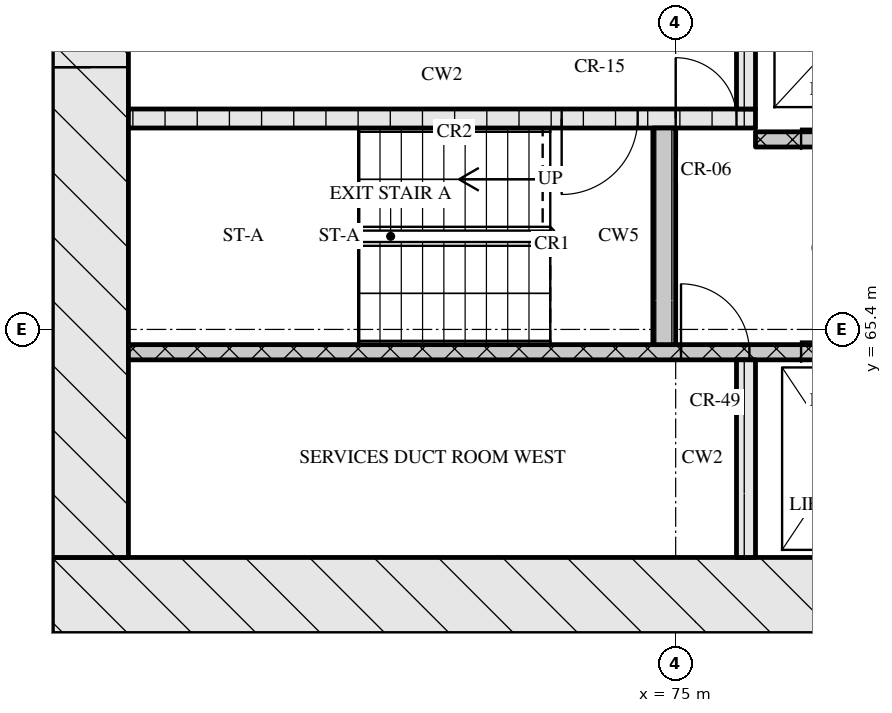
"""IFC4 building model, lengths in metres.
Left out: names, types, materials, properties, quantities, classifications, styles, units other than length and angle.
Written with IfcOpenShell. Run it as: python <this file> out.ifc"""

import sys

from ifc_helpers import new_model, si_unit, direction, frame, frame_2d, origin, place, context, subcontext, project, spatial, rectangle, extrude, element, fill, save


model = new_model("IFC4")
c1 = context("Model", 3, precision=1e-05, world=origin(), true_north=direction((0.0, 1.0)))
c2 = subcontext(c1, "Body", "Model", "MODEL_VIEW")
j1 = project(units=[si_unit("LENGTHUNIT", "METRE"), si_unit("PLANEANGLEUNIT", "RADIAN")], contexts=[c1])
p1 = place(None, origin())
s1 = spatial("IfcSite", under=j1, at=p1, CompositionType="ELEMENT")
p2 = place(p1, origin())
s2 = spatial("IfcBuilding", under=s1, at=p2, CompositionType="ELEMENT")
p3 = place(p2, frame((0.0, 0.0, 116.85)))
s3 = spatial("IfcBuildingStorey", under=s2, at=p3, CompositionType="ELEMENT", Elevation=116.85)
p4 = place(p3, frame((66.8, 61.9, 0.0), z_axis=(0.0, 0.0, 1.0), x_axis=(1.0, 0.0, 0.0)))
e1 = element("IfcWall", 1, at=p4, inside=s3, PredefinedType="SOLIDWALL", context=c2, shape_type="SweptSolid", body=[
    extrude(rectangle(XDim=41.6, YDim=1.0, at=frame_2d((20.8, 0.0))), origin(), (0.0, 0.0, 1.0), 3.32),
])
p5 = place(p4, frame((21.15, 0.0, 0.0)))
e2 = element("IfcOpeningElement", 2, at=p5, cuts=e1, PredefinedType="OPENING", context=c2, shape_type="SweptSolid", body=[
    extrude(rectangle(XDim=1.8, YDim=2.1, at=frame_2d((0.9, 1.05))), frame((0.0, 0.51, 0.0), z_axis=(0.0, -1.0, 0.0), x_axis=(1.0, 0.0, 0.0)), (0.0, 0.0, 1.0), 1.02),
])
p6 = place(p3, frame((67.3, 62.4, 0.0), z_axis=(0.0, 0.0, 1.0), x_axis=(0.0, 1.0, 0.0)))
e3 = element("IfcWall", 3, at=p6, inside=s3, PredefinedType="SOLIDWALL", context=c2, shape_type="SweptSolid", body=[
    extrude(rectangle(XDim=12.0, YDim=1.0, at=frame_2d((6.0, 0.0))), origin(), (0.0, 0.0, 1.0), 3.32),
])
p7 = place(p6, frame((6.45, 0.0, 0.0)))
e4 = element("IfcOpeningElement", 4, at=p7, cuts=e3, PredefinedType="OPENING", context=c2, shape_type="SweptSolid", body=[
    extrude(rectangle(XDim=1.2, YDim=2.1, at=frame_2d((0.6, 1.05))), frame((0.0, 0.51, 0.0), z_axis=(0.0, -1.0, 0.0), x_axis=(1.0, 0.0, 0.0)), (0.0, 0.0, 1.0), 1.02),
])
p8 = place(p3, frame((75.925, 62.4, 0.0), z_axis=(0.0, 0.0, 1.0), x_axis=(0.0, 1.0, 0.0)))
e5 = element("IfcWall", 5, at=p8, inside=s3, PredefinedType="SOLIDWALL", context=c2, shape_type="SweptSolid", body=[
    extrude(rectangle(XDim=2.6, YDim=0.25, at=frame_2d((1.3, 0.0))), origin(), (0.0, 0.0, 1.0), 3.32),
])
p9 = place(p3, frame((67.8, 65.1, 0.0), z_axis=(0.0, 0.0, 1.0), x_axis=(1.0, 0.0, 0.0)))
e6 = element("IfcWall", 6, at=p9, inside=s3, PredefinedType="SOLIDWALL", context=c2, shape_type="SweptSolid", body=[
    extrude(rectangle(XDim=18.5, YDim=0.2, at=frame_2d((9.25, 0.0))), origin(), (0.0, 0.0, 1.0), 3.32),
])
p10 = place(p9, frame((7.27, 0.0, 0.0)))
e7 = element("IfcOpeningElement", 7, at=p10, cuts=e6, PredefinedType="OPENING", context=c2, shape_type="SweptSolid", body=[
    extrude(rectangle(XDim=0.9, YDim=2.1, at=frame_2d((0.45, 1.05))), frame((0.0, 0.11, 0.0), z_axis=(0.0, -1.0, 0.0), x_axis=(1.0, 0.0, 0.0)), (0.0, 0.0, 1.0), 0.22),
])
p11 = place(p9, frame((8.85, 0.0, 0.0)))
e8 = element("IfcOpeningElement", 8, at=p11, cuts=e6, PredefinedType="OPENING", context=c2, shape_type="SweptSolid", body=[
    extrude(rectangle(XDim=1.1, YDim=2.1, at=frame_2d((0.55, 1.05))), frame((0.0, 0.11, 0.0), z_axis=(0.0, -1.0, 0.0), x_axis=(1.0, 0.0, 0.0)), (0.0, 0.0, 1.0), 0.22),
])
p12 = place(p9, frame((11.35, 0.0, 0.0)))
e9 = element("IfcOpeningElement", 9, at=p12, cuts=e6, PredefinedType="OPENING", context=c2, shape_type="SweptSolid", body=[
    extrude(rectangle(XDim=1.1, YDim=2.1, at=frame_2d((0.55, 1.05))), frame((0.0, 0.11, 0.0), z_axis=(0.0, -1.0, 0.0), x_axis=(1.0, 0.0, 0.0)), (0.0, 0.0, 1.0), 0.22),
])
p13 = place(p9, frame((13.85, 0.0, 0.0)))
e10 = element("IfcOpeningElement", 10, at=p13, cuts=e6, PredefinedType="OPENING", context=c2, shape_type="SweptSolid", body=[
    extrude(rectangle(XDim=1.1, YDim=2.1, at=frame_2d((0.55, 1.05))), frame((0.0, 0.11, 0.0), z_axis=(0.0, -1.0, 0.0), x_axis=(1.0, 0.0, 0.0)), (0.0, 0.0, 1.0), 0.22),
])
p14 = place(p9, frame((16.7, 0.0, 0.0)))
e11 = element("IfcOpeningElement", 11, at=p14, cuts=e6, PredefinedType="OPENING", context=c2, shape_type="SweptSolid", body=[
    extrude(rectangle(XDim=0.9, YDim=2.1, at=frame_2d((0.45, 1.05))), frame((0.0, 0.11, 0.0), z_axis=(0.0, -1.0, 0.0), x_axis=(1.0, 0.0, 0.0)), (0.0, 0.0, 1.0), 0.22),
])
p15 = place(p3, frame((74.85, 65.2, 0.0), z_axis=(0.0, 0.0, 1.0), x_axis=(0.0, 1.0, 0.0)))
e12 = element("IfcWall", 12, at=p15, inside=s3, PredefinedType="SOLIDWALL", context=c2, shape_type="SweptSolid", body=[
    extrude(rectangle(XDim=2.85, YDim=0.3, at=frame_2d((1.425, 0.0))), origin(), (0.0, 0.0, 1.0), 3.32),
])
p16 = place(p3, frame((76.05, 67.9, 0.0), z_axis=(0.0, 0.0, 1.0), x_axis=(1.0, 0.0, 0.0)))
e13 = element("IfcWall", 13, at=p16, inside=s3, PredefinedType="SOLIDWALL", context=c2, shape_type="SweptSolid", body=[
    extrude(rectangle(XDim=23.1, YDim=0.2, at=frame_2d((11.55, 0.0))), origin(), (0.0, 0.0, 1.0), 3.32),
])
p17 = place(p16, frame((0.6, 0.0, 0.0)))
e14 = element("IfcOpeningElement", 14, at=p17, cuts=e13, PredefinedType="OPENING", context=c2, shape_type="SweptSolid", body=[
    extrude(rectangle(XDim=1.1, YDim=2.1, at=frame_2d((0.55, 1.05))), frame((0.0, 0.11, 0.0), z_axis=(0.0, -1.0, 0.0), x_axis=(1.0, 0.0, 0.0)), (0.0, 0.0, 1.0), 0.22),
])
p18 = place(p16, frame((3.1, 0.0, 0.0)))
e15 = element("IfcOpeningElement", 15, at=p18, cuts=e13, PredefinedType="OPENING", context=c2, shape_type="SweptSolid", body=[
    extrude(rectangle(XDim=1.1, YDim=2.1, at=frame_2d((0.55, 1.05))), frame((0.0, 0.11, 0.0), z_axis=(0.0, -1.0, 0.0), x_axis=(1.0, 0.0, 0.0)), (0.0, 0.0, 1.0), 0.22),
])
p19 = place(p16, frame((5.6, 0.0, 0.0)))
e16 = element("IfcOpeningElement", 16, at=p19, cuts=e13, PredefinedType="OPENING", context=c2, shape_type="SweptSolid", body=[
    extrude(rectangle(XDim=1.1, YDim=2.1, at=frame_2d((0.55, 1.05))), frame((0.0, 0.11, 0.0), z_axis=(0.0, -1.0, 0.0), x_axis=(1.0, 0.0, 0.0)), (0.0, 0.0, 1.0), 0.22),
])
p20 = place(p16, frame((8.45, 0.0, 0.0)))
e17 = element("IfcOpeningElement", 17, at=p20, cuts=e13, PredefinedType="OPENING", context=c2, shape_type="SweptSolid", body=[
    extrude(rectangle(XDim=0.9, YDim=2.1, at=frame_2d((0.45, 1.05))), frame((0.0, 0.11, 0.0), z_axis=(0.0, -1.0, 0.0), x_axis=(1.0, 0.0, 0.0)), (0.0, 0.0, 1.0), 0.22),
])
p21 = place(p16, frame((10.91, 0.0, 0.0)))
e18 = element("IfcOpeningElement", 18, at=p21, cuts=e13, PredefinedType="OPENING", context=c2, shape_type="SweptSolid", body=[
    extrude(rectangle(XDim=0.9, YDim=2.1, at=frame_2d((0.45, 1.05))), frame((0.0, 0.11, 0.0), z_axis=(0.0, -1.0, 0.0), x_axis=(1.0, 0.0, 0.0)), (0.0, 0.0, 1.0), 0.22),
])
p22 = place(p16, frame((13.55, 0.0, 0.0)))
e19 = element("IfcOpeningElement", 19, at=p22, cuts=e13, PredefinedType="OPENING", context=c2, shape_type="SweptSolid", body=[
    extrude(rectangle(XDim=1.0, YDim=2.1, at=frame_2d((0.5, 1.05))), frame((0.0, 0.11, 0.0), z_axis=(0.0, -1.0, 0.0), x_axis=(1.0, 0.0, 0.0)), (0.0, 0.0, 1.0), 0.22),
])
p23 = place(p3, frame((67.8, 68.175, 0.0), z_axis=(0.0, 0.0, 1.0), x_axis=(1.0, 0.0, 0.0)))
e20 = element("IfcWall", 20, at=p23, inside=s3, PredefinedType="SOLIDWALL", context=c2, shape_type="SweptSolid", body=[
    extrude(rectangle(XDim=8.25, YDim=0.25, at=frame_2d((4.125, 0.0))), origin(), (0.0, 0.0, 1.0), 3.32),
])
p24 = place(p23, frame((5.7, 0.0, 0.0)))
e21 = element("IfcOpeningElement", 21, at=p24, cuts=e20, PredefinedType="OPENING", context=c2, shape_type="SweptSolid", body=[
    extrude(rectangle(XDim=1.0, YDim=2.1, at=frame_2d((0.5, 1.05))), frame((0.0, 0.135, 0.0), z_axis=(0.0, -1.0, 0.0), x_axis=(1.0, 0.0, 0.0)), (0.0, 0.0, 1.0), 0.27),
])
p25 = place(p23, frame((7.2, 0.0, 0.0)))
e22 = element("IfcOpeningElement", 22, at=p25, cuts=e20, PredefinedType="OPENING", context=c2, shape_type="SweptSolid", body=[
    extrude(rectangle(XDim=0.8, YDim=2.1, at=frame_2d((0.4, 1.05))), frame((0.0, 0.135, 0.0), z_axis=(0.0, -1.0, 0.0), x_axis=(1.0, 0.0, 0.0)), (0.0, 0.0, 1.0), 0.27),
])
p26 = place(p3, frame((75.925, 68.3, 0.0), z_axis=(0.0, 0.0, 1.0), x_axis=(0.0, 1.0, 0.0)))
e23 = element("IfcWall", 23, at=p26, inside=s3, PredefinedType="SOLIDWALL", context=c2, shape_type="SweptSolid", body=[
    extrude(rectangle(XDim=2.3, YDim=0.25, at=frame_2d((1.15, 0.0))), origin(), (0.0, 0.0, 1.0), 3.32),
])
p27 = place(p10, origin())
e24 = element("IfcDoor", 24, at=p27, inside=s3, OperationType="SINGLE_SWING_LEFT", PredefinedType="DOOR", context=c2, shape_type="SweptSolid", body=[
    extrude(rectangle(XDim=0.9, YDim=2.1, at=frame_2d((0.45, 1.05))), frame((0.0, 0.025, 0.0), z_axis=(0.0, -1.0, 0.0), x_axis=(1.0, 0.0, 0.0)), (0.0, 0.0, 1.0), 0.05),
])
fill(e7, e24)
p28 = place(p11, origin())
e25 = element("IfcDoor", 25, at=p28, inside=s3, OperationType="SLIDING_TO_LEFT", PredefinedType="DOOR", context=c2, shape_type="SweptSolid", body=[
    extrude(rectangle(XDim=1.1, YDim=2.1, at=frame_2d((0.55, 1.05))), frame((0.0, 0.025, 0.0), z_axis=(0.0, -1.0, 0.0), x_axis=(1.0, 0.0, 0.0)), (0.0, 0.0, 1.0), 0.05),
])
fill(e8, e25)
p29 = place(p17, origin())
e26 = element("IfcDoor", 26, at=p29, inside=s3, OperationType="SLIDING_TO_RIGHT", PredefinedType="DOOR", context=c2, shape_type="SweptSolid", body=[
    extrude(rectangle(XDim=1.1, YDim=2.1, at=frame_2d((0.55, 1.05))), frame((0.0, 0.025, 0.0), z_axis=(0.0, -1.0, 0.0), x_axis=(1.0, 0.0, 0.0)), (0.0, 0.0, 1.0), 0.05),
])
fill(e14, e26)
p30 = place(p24, origin())
e27 = element("IfcDoor", 27, at=p30, inside=s3, OperationType="SINGLE_SWING_RIGHT", PredefinedType="DOOR", context=c2, shape_type="SweptSolid", body=[
    extrude(rectangle(XDim=1.0, YDim=2.1, at=frame_2d((0.5, 1.05))), frame((0.0, 0.025, 0.0), z_axis=(0.0, -1.0, 0.0), x_axis=(1.0, 0.0, 0.0)), (0.0, 0.0, 1.0), 0.05),
])
fill(e21, e27)
p31 = place(p25, origin())
e28 = element("IfcDoor", 28, at=p31, inside=s3, OperationType="SINGLE_SWING_LEFT", PredefinedType="DOOR", context=c2, shape_type="SweptSolid", body=[
    extrude(rectangle(XDim=0.8, YDim=2.1, at=frame_2d((0.4, 1.05))), frame((0.0, 0.025, 0.0), z_axis=(0.0, -1.0, 0.0), x_axis=(1.0, 0.0, 0.0)), (0.0, 0.0, 1.0), 0.05),
])
fill(e22, e28)
p32 = place(p7, origin())
e29 = element("IfcDoor", 29, at=p32, inside=s3, OperationType="SINGLE_SWING_LEFT", PredefinedType="DOOR", context=c2, shape_type="SweptSolid", body=[
    extrude(rectangle(XDim=1.2, YDim=2.1, at=frame_2d((0.6, 1.05))), frame((0.0, 0.025, 0.0), z_axis=(0.0, -1.0, 0.0), x_axis=(1.0, 0.0, 0.0)), (0.0, 0.0, 1.0), 0.05),
])
fill(e4, e29)
save(model, sys.argv[1])
